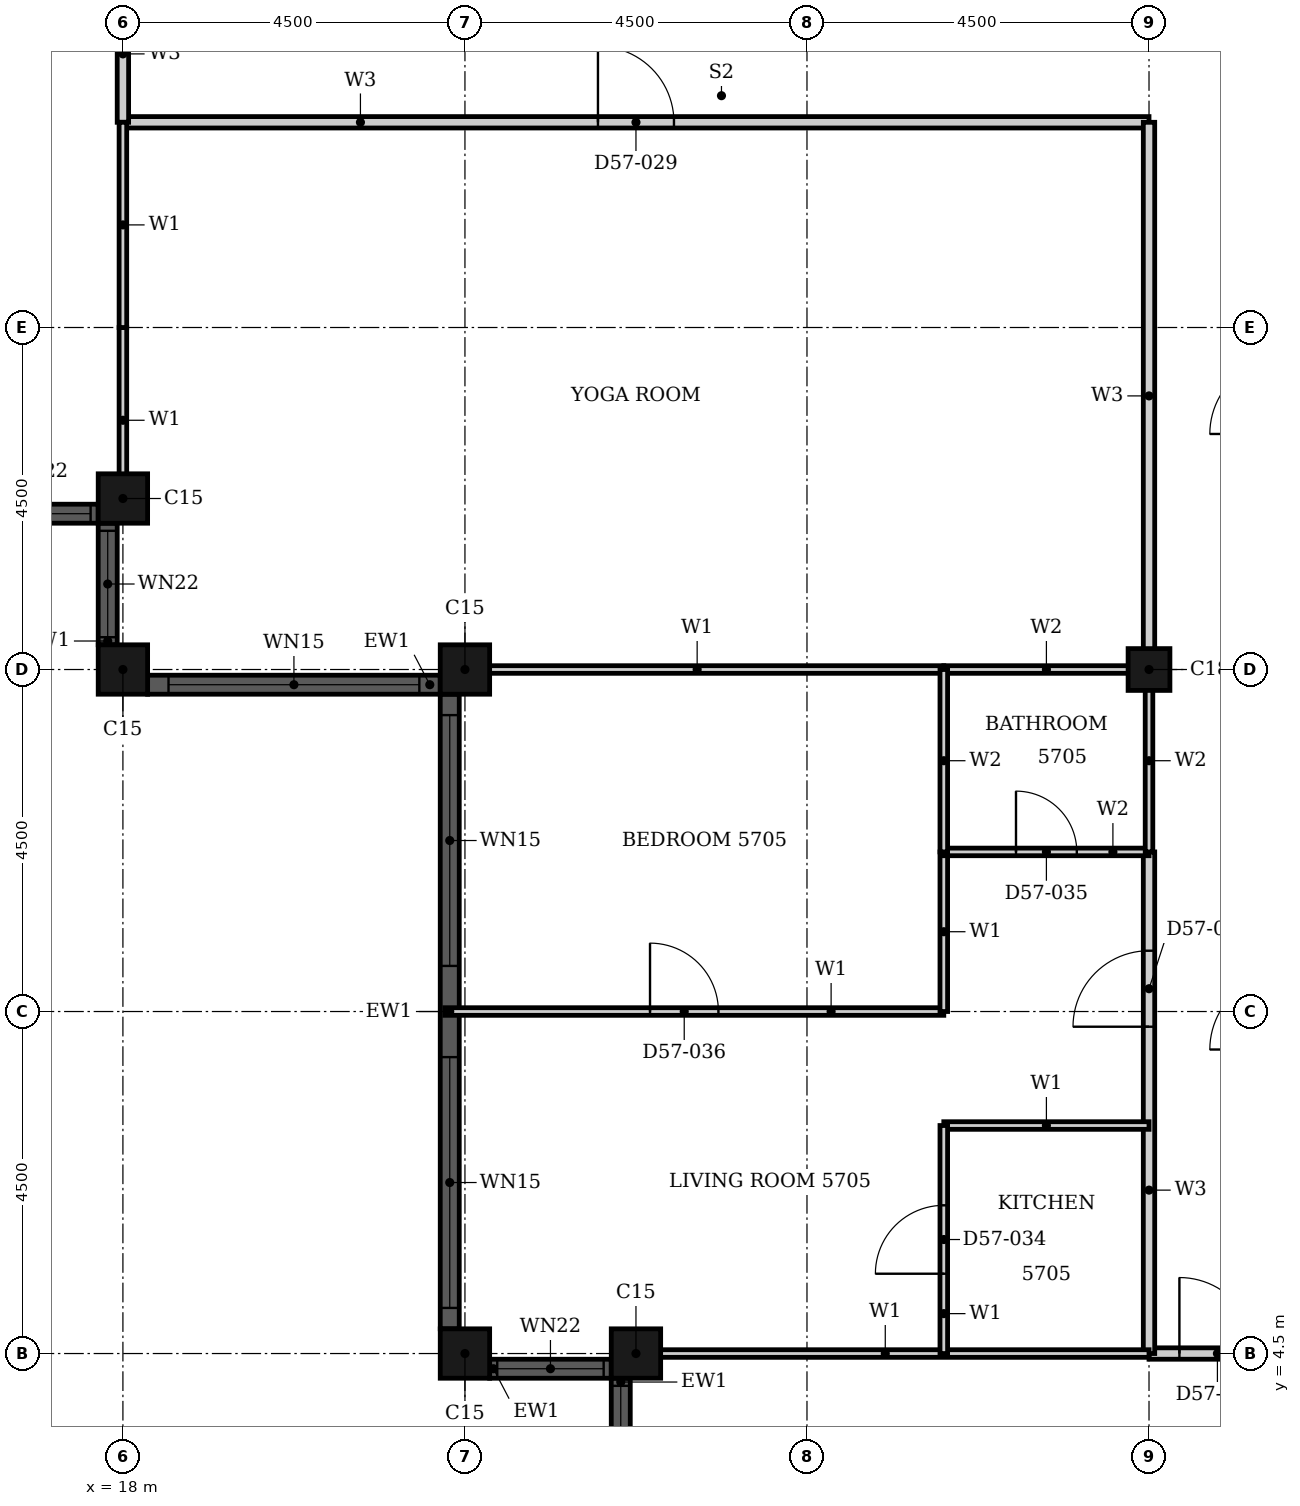
"""IFC4 building model, lengths in metres.
Left out: names, types, materials, properties, quantities, classifications, styles, units other than length and angle.
Written with IfcOpenShell. Run it as: python <this file> out.ifc"""

import sys

from ifc_helpers import new_model, si_unit, direction, frame, frame_2d, origin, origin_2d, place, context, subcontext, project, spatial, rectangle, hollow_rectangle, extrude, element, fill, save


model = new_model("IFC4")
c1 = context("Model", 3, precision=1e-05, world=origin(), true_north=direction((0.0, 1.0)))
c2 = subcontext(c1, "Body", "Model", "MODEL_VIEW")
j1 = project(units=[si_unit("LENGTHUNIT", "METRE"), si_unit("PLANEANGLEUNIT", "RADIAN")], contexts=[c1])
p1 = place(None, origin())
s1 = spatial("IfcSite", under=j1, at=p1, CompositionType="ELEMENT")
p2 = place(p1, origin())
s2 = spatial("IfcBuilding", under=s1, at=p2, CompositionType="ELEMENT")
p3 = place(p2, frame((0.0, 0.0, 225.7)))
s3 = spatial("IfcBuildingStorey", under=s2, at=p3, CompositionType="ELEMENT", Elevation=225.7)
for number, where, z_axis, x_axis in (
    (1, (18.0, 15.75, 0.0), (0.0, 0.0, 1.0), (1.0, 0.0, 0.0)),
    (2, (18.0, 13.5, 0.0), (0.0, 0.0, 1.0), (1.0, 0.0, 0.0)),
    (3, (22.5, 13.5, 0.0), (0.0, 0.0, 1.0), (1.0, 0.0, 0.0)),
    (4, (22.5, 4.5, 0.0), (0.0, 0.0, 1.0), (1.0, 0.0, 0.0)),
    (5, (24.75, 4.5, 0.0), (0.0, 0.0, 1.0), (1.0, 0.0, 0.0)),
):
    element("IfcColumn", number, at=place(p3, frame(where, z_axis=z_axis, x_axis=x_axis)), inside=s3, PredefinedType="COLUMN", context=c2, shape_type="SweptSolid", body=[
        extrude(hollow_rectangle(XDim=0.65, YDim=0.65, WallThickness=0.021, at=origin_2d()), origin(), (0.0, 0.0, 1.0), 3.7),
    ])
p4 = place(p3, frame((31.5, 13.5, 0.0), z_axis=(0.0, 0.0, 1.0), x_axis=(1.0, 0.0, 0.0)))
e6 = element("IfcColumn", 6, at=p4, inside=s3, PredefinedType="COLUMN", context=c2, shape_type="SweptSolid", body=[
    extrude(hollow_rectangle(XDim=0.55, YDim=0.55, WallThickness=0.018, at=origin_2d()), origin(), (0.0, 0.0, 1.0), 3.7),
])
p5 = place(p3, frame((16.075, 15.55, 0.0), z_axis=(0.0, 0.0, 1.0), x_axis=(1.0, 0.0, 0.0)))
e7 = element("IfcWall", 7, at=p5, inside=s3, PredefinedType="SOLIDWALL", context=c2, shape_type="SweptSolid", body=[
    extrude(rectangle(XDim=1.6, YDim=0.25, at=frame_2d((0.8, 0.0))), origin(), (0.0, 0.0, 1.0), 3.7),
])
p6 = place(p5, frame((0.1, 0.0, 0.9)))
e8 = element("IfcOpeningElement", 8, at=p6, cuts=e7, PredefinedType="OPENING", context=c2, shape_type="SweptSolid", body=[
    extrude(rectangle(XDim=1.4, YDim=1.85, at=frame_2d((0.7, 0.925))), frame((0.0, 0.135, 0.0), z_axis=(0.0, -1.0, 0.0), x_axis=(1.0, 0.0, 0.0)), (0.0, 0.0, 1.0), 0.27),
])
p7 = place(p3, frame((17.8, 15.425, 0.0), z_axis=(0.0, 0.0, 1.0), x_axis=(0.0, -1.0, 0.0)))
e9 = element("IfcWall", 9, at=p7, inside=s3, PredefinedType="SOLIDWALL", context=c2, shape_type="SweptSolid", body=[
    extrude(rectangle(XDim=1.6, YDim=0.25, at=frame_2d((0.8, 0.0))), origin(), (0.0, 0.0, 1.0), 3.7),
])
p8 = place(p7, frame((0.1, 0.0, 0.9)))
e10 = element("IfcOpeningElement", 10, at=p8, cuts=e9, PredefinedType="OPENING", context=c2, shape_type="SweptSolid", body=[
    extrude(rectangle(XDim=1.4, YDim=1.85, at=frame_2d((0.7, 0.925))), frame((0.0, 0.135, 0.0), z_axis=(0.0, -1.0, 0.0), x_axis=(1.0, 0.0, 0.0)), (0.0, 0.0, 1.0), 0.27),
])
p9 = place(p3, frame((18.325, 13.3, 0.0), z_axis=(0.0, 0.0, 1.0), x_axis=(1.0, 0.0, 0.0)))
e11 = element("IfcWall", 11, at=p9, inside=s3, PredefinedType="SOLIDWALL", context=c2, shape_type="SweptSolid", body=[
    extrude(rectangle(XDim=3.85, YDim=0.25, at=frame_2d((1.925, 0.0))), origin(), (0.0, 0.0, 1.0), 3.7),
])
p10 = place(p9, frame((0.275, 0.0, 0.45)))
e12 = element("IfcOpeningElement", 12, at=p10, cuts=e11, PredefinedType="OPENING", context=c2, shape_type="SweptSolid", body=[
    extrude(rectangle(XDim=3.3, YDim=2.3, at=frame_2d((1.65, 1.15))), frame((0.0, 0.135, 0.0), z_axis=(0.0, -1.0, 0.0), x_axis=(1.0, 0.0, 0.0)), (0.0, 0.0, 1.0), 0.27),
])
p11 = place(p3, frame((22.3, 13.175, 0.0), z_axis=(0.0, 0.0, 1.0), x_axis=(0.0, -1.0, 0.0)))
e13 = element("IfcWall", 13, at=p11, inside=s3, PredefinedType="SOLIDWALL", context=c2, shape_type="SweptSolid", body=[
    extrude(rectangle(XDim=8.35, YDim=0.25, at=frame_2d((4.175, 0.0))), origin(), (0.0, 0.0, 1.0), 3.7),
])
p12 = place(p11, frame((0.275, 0.0, 0.45)))
e14 = element("IfcOpeningElement", 14, at=p12, cuts=e13, PredefinedType="OPENING", context=c2, shape_type="SweptSolid", body=[
    extrude(rectangle(XDim=3.3, YDim=2.3, at=frame_2d((1.65, 1.15))), frame((0.0, 0.135, 0.0), z_axis=(0.0, -1.0, 0.0), x_axis=(1.0, 0.0, 0.0)), (0.0, 0.0, 1.0), 0.27),
])
p13 = place(p11, frame((4.775, 0.0, 0.45)))
e15 = element("IfcOpeningElement", 15, at=p13, cuts=e13, PredefinedType="OPENING", context=c2, shape_type="SweptSolid", body=[
    extrude(rectangle(XDim=3.3, YDim=2.3, at=frame_2d((1.65, 1.15))), frame((0.0, 0.135, 0.0), z_axis=(0.0, -1.0, 0.0), x_axis=(1.0, 0.0, 0.0)), (0.0, 0.0, 1.0), 0.27),
])
p14 = place(p3, frame((22.825, 4.3, 0.0), z_axis=(0.0, 0.0, 1.0), x_axis=(1.0, 0.0, 0.0)))
e16 = element("IfcWall", 16, at=p14, inside=s3, PredefinedType="SOLIDWALL", context=c2, shape_type="SweptSolid", body=[
    extrude(rectangle(XDim=1.6, YDim=0.25, at=frame_2d((0.8, 0.0))), origin(), (0.0, 0.0, 1.0), 3.7),
])
p15 = place(p14, frame((0.1, 0.0, 0.9)))
e17 = element("IfcOpeningElement", 17, at=p15, cuts=e16, PredefinedType="OPENING", context=c2, shape_type="SweptSolid", body=[
    extrude(rectangle(XDim=1.4, YDim=1.85, at=frame_2d((0.7, 0.925))), frame((0.0, 0.135, 0.0), z_axis=(0.0, -1.0, 0.0), x_axis=(1.0, 0.0, 0.0)), (0.0, 0.0, 1.0), 0.27),
])
p16 = place(p3, frame((24.55, 4.175, 0.0), z_axis=(0.0, 0.0, 1.0), x_axis=(0.0, -1.0, 0.0)))
e18 = element("IfcWall", 18, at=p16, inside=s3, PredefinedType="SOLIDWALL", context=c2, shape_type="SweptSolid", body=[
    extrude(rectangle(XDim=1.6, YDim=0.25, at=frame_2d((0.8, 0.0))), origin(), (0.0, 0.0, 1.0), 3.7),
])
p17 = place(p16, frame((0.1, 0.0, 0.9)))
e19 = element("IfcOpeningElement", 19, at=p17, cuts=e18, PredefinedType="OPENING", context=c2, shape_type="SweptSolid", body=[
    extrude(rectangle(XDim=1.4, YDim=1.85, at=frame_2d((0.7, 0.925))), frame((0.0, 0.135, 0.0), z_axis=(0.0, -1.0, 0.0), x_axis=(1.0, 0.0, 0.0)), (0.0, 0.0, 1.0), 0.27),
])
p18 = place(p3, frame((18.0, 20.7, 0.0), z_axis=(0.0, 0.0, 1.0), x_axis=(1.0, 0.0, 0.0)))
e20 = element("IfcWall", 20, at=p18, inside=s3, PredefinedType="PARTITIONING", context=c2, shape_type="SweptSolid", body=[
    extrude(rectangle(XDim=13.5, YDim=0.15, at=frame_2d((6.75, 0.0))), origin(), (0.0, 0.0, 1.0), 3.4),
])
p19 = place(p18, frame((6.25, 0.0, 0.0)))
e21 = element("IfcOpeningElement", 21, at=p19, cuts=e20, PredefinedType="OPENING", context=c2, shape_type="SweptSolid", body=[
    extrude(rectangle(XDim=1.0, YDim=2.1, at=frame_2d((0.5, 1.05))), frame((0.0, 0.085, 0.0), z_axis=(0.0, -1.0, 0.0), x_axis=(1.0, 0.0, 0.0)), (0.0, 0.0, 1.0), 0.17),
])
p20 = place(p3, frame((31.5, 4.5, 0.0), z_axis=(0.0, 0.0, 1.0), x_axis=(1.0, 0.0, 0.0)))
e22 = element("IfcWall", 22, at=p20, inside=s3, PredefinedType="PARTITIONING", context=c2, shape_type="SweptSolid", body=[
    extrude(rectangle(XDim=1.8, YDim=0.15, at=frame_2d((0.9, 0.0))), origin(), (0.0, 0.0, 1.0), 3.4),
])
p21 = place(p20, frame((0.4, 0.0, 0.0)))
e23 = element("IfcOpeningElement", 23, at=p21, cuts=e22, PredefinedType="OPENING", context=c2, shape_type="SweptSolid", body=[
    extrude(rectangle(XDim=1.0, YDim=2.1, at=frame_2d((0.5, 1.05))), frame((0.0, 0.085, 0.0), z_axis=(0.0, -1.0, 0.0), x_axis=(1.0, 0.0, 0.0)), (0.0, 0.0, 1.0), 0.17),
])
p22 = place(p3, frame((18.0, 20.7, 0.0), z_axis=(0.0, 0.0, 1.0), x_axis=(0.0, 1.0, 0.0)))
e24 = element("IfcWall", 24, at=p22, inside=s3, PredefinedType="PARTITIONING", context=c2, shape_type="SweptSolid", body=[
    extrude(rectangle(XDim=1.8, YDim=0.15, at=frame_2d((0.9, 0.0))), origin(), (0.0, 0.0, 1.0), 3.4),
])
p23 = place(p3, frame((31.5, 4.5, 0.0), z_axis=(0.0, 0.0, 1.0), x_axis=(0.0, 1.0, 0.0)))
e25 = element("IfcWall", 25, at=p23, inside=s3, PredefinedType="PARTITIONING", context=c2, shape_type="SweptSolid", body=[
    extrude(rectangle(XDim=6.6, YDim=0.15, at=frame_2d((3.3, 0.0))), origin(), (0.0, 0.0, 1.0), 2.68),
])
p24 = place(p23, frame((4.3, 0.0, 0.0)))
e26 = element("IfcOpeningElement", 26, at=p24, cuts=e25, PredefinedType="OPENING", context=c2, shape_type="SweptSolid", body=[
    extrude(rectangle(XDim=1.0, YDim=2.2, at=frame_2d((0.5, 1.1))), frame((0.0, 0.085, 0.0), z_axis=(0.0, -1.0, 0.0), x_axis=(1.0, 0.0, 0.0)), (0.0, 0.0, 1.0), 0.17),
])
p25 = place(p3, frame((31.5, 13.5, 0.0), z_axis=(0.0, 0.0, 1.0), x_axis=(0.0, 1.0, 0.0)))
e27 = element("IfcWall", 27, at=p25, inside=s3, PredefinedType="PARTITIONING", context=c2, shape_type="SweptSolid", body=[
    extrude(rectangle(XDim=7.2, YDim=0.15, at=frame_2d((3.6, 0.0))), origin(), (0.0, 0.0, 1.0), 3.4),
])
p26 = place(p3, frame((22.31, 13.5, 0.0), z_axis=(0.0, 0.0, 1.0), x_axis=(1.0, 0.0, 0.0)))
e28 = element("IfcWall", 28, at=p26, inside=s3, PredefinedType="PARTITIONING", context=c2, shape_type="SweptSolid", body=[
    extrude(rectangle(XDim=6.49, YDim=0.1, at=frame_2d((3.245, 0.0))), origin(), (0.0, 0.0, 1.0), 2.48),
])
p27 = place(p3, frame((24.56, 4.5, 0.0), z_axis=(0.0, 0.0, 1.0), x_axis=(1.0, 0.0, 0.0)))
e29 = element("IfcWall", 29, at=p27, inside=s3, PredefinedType="PARTITIONING", context=c2, shape_type="SweptSolid", body=[
    extrude(rectangle(XDim=6.94, YDim=0.1, at=frame_2d((3.47, 0.0))), origin(), (0.0, 0.0, 1.0), 3.4),
])
p28 = place(p3, frame((28.8, 7.5, 0.0), z_axis=(0.0, 0.0, 1.0), x_axis=(1.0, 0.0, 0.0)))
e30 = element("IfcWall", 30, at=p28, inside=s3, PredefinedType="PARTITIONING", context=c2, shape_type="SweptSolid", body=[
    extrude(rectangle(XDim=2.7, YDim=0.1, at=frame_2d((1.35, 0.0))), origin(), (0.0, 0.0, 1.0), 3.4),
])
p29 = place(p3, frame((22.235, 9.0, 0.0), z_axis=(0.0, 0.0, 1.0), x_axis=(1.0, 0.0, 0.0)))
e31 = element("IfcWall", 31, at=p29, inside=s3, PredefinedType="PARTITIONING", context=c2, shape_type="SweptSolid", body=[
    extrude(rectangle(XDim=6.565, YDim=0.1, at=frame_2d((3.282, 0.0))), origin(), (0.0, 0.0, 1.0), 3.4),
])
p30 = place(p29, frame((2.7, 0.0, 0.0)))
e32 = element("IfcOpeningElement", 32, at=p30, cuts=e31, PredefinedType="OPENING", context=c2, shape_type="SweptSolid", body=[
    extrude(rectangle(XDim=0.9, YDim=2.1, at=frame_2d((0.45, 1.05))), frame((0.0, 0.06, 0.0), z_axis=(0.0, -1.0, 0.0), x_axis=(1.0, 0.0, 0.0)), (0.0, 0.0, 1.0), 0.12),
])
p31 = place(p3, frame((18.0, 15.56, 0.0), z_axis=(0.0, 0.0, 1.0), x_axis=(0.0, 1.0, 0.0)))
e33 = element("IfcWall", 33, at=p31, inside=s3, PredefinedType="PARTITIONING", context=c2, shape_type="SweptSolid", body=[
    extrude(rectangle(XDim=2.439, YDim=0.1, at=frame_2d((1.219, 0.0))), origin(), (0.0, 0.0, 1.0), 3.4),
])
p32 = place(p3, frame((18.0, 18.0, 0.0), z_axis=(0.0, 0.0, 1.0), x_axis=(0.0, 1.0, 0.0)))
e34 = element("IfcWall", 34, at=p32, inside=s3, PredefinedType="PARTITIONING", context=c2, shape_type="SweptSolid", body=[
    extrude(rectangle(XDim=2.7, YDim=0.1, at=frame_2d((1.35, 0.0))), origin(), (0.0, 0.0, 1.0), 3.4),
])
p33 = place(p3, frame((28.8, 9.0, 0.0), z_axis=(0.0, 0.0, 1.0), x_axis=(0.0, 1.0, 0.0)))
e35 = element("IfcWall", 35, at=p33, inside=s3, PredefinedType="PARTITIONING", context=c2, shape_type="SweptSolid", body=[
    extrude(rectangle(XDim=2.1, YDim=0.1, at=frame_2d((1.05, 0.0))), origin(), (0.0, 0.0, 1.0), 3.4),
])
p34 = place(p3, frame((28.8, 4.5, 0.0), z_axis=(0.0, 0.0, 1.0), x_axis=(0.0, 1.0, 0.0)))
e36 = element("IfcWall", 36, at=p34, inside=s3, PredefinedType="PARTITIONING", context=c2, shape_type="SweptSolid", body=[
    extrude(rectangle(XDim=3.0, YDim=0.1, at=frame_2d((1.5, 0.0))), origin(), (0.0, 0.0, 1.0), 3.4),
])
p35 = place(p34, frame((1.05, 0.0, 0.0)))
e37 = element("IfcOpeningElement", 37, at=p35, cuts=e36, PredefinedType="OPENING", context=c2, shape_type="SweptSolid", body=[
    extrude(rectangle(XDim=0.9, YDim=2.1, at=frame_2d((0.45, 1.05))), frame((0.0, 0.06, 0.0), z_axis=(0.0, -1.0, 0.0), x_axis=(1.0, 0.0, 0.0)), (0.0, 0.0, 1.0), 0.12),
])
p36 = place(p3, frame((28.8, 11.1, 0.0), z_axis=(0.0, 0.0, 1.0), x_axis=(1.0, 0.0, 0.0)))
e38 = element("IfcWall", 38, at=p36, inside=s3, PredefinedType="PARTITIONING", context=c2, shape_type="SweptSolid", body=[
    extrude(rectangle(XDim=2.7, YDim=0.1, at=frame_2d((1.35, 0.0))), origin(), (0.0, 0.0, 1.0), 3.4),
])
p37 = place(p36, frame((0.95, 0.0, 0.0)))
e39 = element("IfcOpeningElement", 39, at=p37, cuts=e38, PredefinedType="OPENING", context=c2, shape_type="SweptSolid", body=[
    extrude(rectangle(XDim=0.8, YDim=2.1, at=frame_2d((0.4, 1.05))), frame((0.0, 0.06, 0.0), z_axis=(0.0, -1.0, 0.0), x_axis=(1.0, 0.0, 0.0)), (0.0, 0.0, 1.0), 0.12),
])
p38 = place(p3, frame((28.8, 13.5, 0.0), z_axis=(0.0, 0.0, 1.0), x_axis=(1.0, 0.0, 0.0)))
e40 = element("IfcWall", 40, at=p38, inside=s3, PredefinedType="PARTITIONING", context=c2, shape_type="SweptSolid", body=[
    extrude(rectangle(XDim=2.7, YDim=0.1, at=frame_2d((1.35, 0.0))), origin(), (0.0, 0.0, 1.0), 2.48),
])
p39 = place(p3, frame((28.8, 11.1, 0.0), z_axis=(0.0, 0.0, 1.0), x_axis=(0.0, 1.0, 0.0)))
e41 = element("IfcWall", 41, at=p39, inside=s3, PredefinedType="PARTITIONING", context=c2, shape_type="SweptSolid", body=[
    extrude(rectangle(XDim=2.4, YDim=0.1, at=frame_2d((1.2, 0.0))), origin(), (0.0, 0.0, 1.0), 3.4),
])
p40 = place(p3, frame((31.5, 11.1, 0.0), z_axis=(0.0, 0.0, 1.0), x_axis=(0.0, 1.0, 0.0)))
e42 = element("IfcWall", 42, at=p40, inside=s3, PredefinedType="PARTITIONING", context=c2, shape_type="SweptSolid", body=[
    extrude(rectangle(XDim=2.4, YDim=0.1, at=frame_2d((1.2, 0.0))), origin(), (0.0, 0.0, 1.0), 2.68),
])
p41 = place(p6, origin())
e43 = element("IfcWindow", 43, at=p41, inside=s3, PartitioningType="SINGLE_PANEL", PredefinedType="WINDOW", context=c2, shape_type="SweptSolid", body=[
    extrude(rectangle(XDim=1.4, YDim=1.85, at=frame_2d((0.7, 0.925))), frame((0.0, 0.03, 0.0), z_axis=(0.0, -1.0, 0.0), x_axis=(1.0, 0.0, 0.0)), (0.0, 0.0, 1.0), 0.06),
])
fill(e8, e43)
p42 = place(p8, origin())
e44 = element("IfcWindow", 44, at=p42, inside=s3, PartitioningType="SINGLE_PANEL", PredefinedType="WINDOW", context=c2, shape_type="SweptSolid", body=[
    extrude(rectangle(XDim=1.4, YDim=1.85, at=frame_2d((0.7, 0.925))), frame((0.0, 0.03, 0.0), z_axis=(0.0, -1.0, 0.0), x_axis=(1.0, 0.0, 0.0)), (0.0, 0.0, 1.0), 0.06),
])
fill(e10, e44)
p43 = place(p10, origin())
e45 = element("IfcWindow", 45, at=p43, inside=s3, PartitioningType="SINGLE_PANEL", PredefinedType="WINDOW", context=c2, shape_type="SweptSolid", body=[
    extrude(rectangle(XDim=3.3, YDim=2.3, at=frame_2d((1.65, 1.15))), frame((0.0, 0.03, 0.0), z_axis=(0.0, -1.0, 0.0), x_axis=(1.0, 0.0, 0.0)), (0.0, 0.0, 1.0), 0.06),
])
fill(e12, e45)
p44 = place(p12, origin())
e46 = element("IfcWindow", 46, at=p44, inside=s3, PartitioningType="SINGLE_PANEL", PredefinedType="WINDOW", context=c2, shape_type="SweptSolid", body=[
    extrude(rectangle(XDim=3.3, YDim=2.3, at=frame_2d((1.65, 1.15))), frame((0.0, 0.03, 0.0), z_axis=(0.0, -1.0, 0.0), x_axis=(1.0, 0.0, 0.0)), (0.0, 0.0, 1.0), 0.06),
])
fill(e14, e46)
p45 = place(p13, origin())
e47 = element("IfcWindow", 47, at=p45, inside=s3, PartitioningType="SINGLE_PANEL", PredefinedType="WINDOW", context=c2, shape_type="SweptSolid", body=[
    extrude(rectangle(XDim=3.3, YDim=2.3, at=frame_2d((1.65, 1.15))), frame((0.0, 0.03, 0.0), z_axis=(0.0, -1.0, 0.0), x_axis=(1.0, 0.0, 0.0)), (0.0, 0.0, 1.0), 0.06),
])
fill(e15, e47)
p46 = place(p15, origin())
e48 = element("IfcWindow", 48, at=p46, inside=s3, PartitioningType="SINGLE_PANEL", PredefinedType="WINDOW", context=c2, shape_type="SweptSolid", body=[
    extrude(rectangle(XDim=1.4, YDim=1.85, at=frame_2d((0.7, 0.925))), frame((0.0, 0.03, 0.0), z_axis=(0.0, -1.0, 0.0), x_axis=(1.0, 0.0, 0.0)), (0.0, 0.0, 1.0), 0.06),
])
fill(e17, e48)
p47 = place(p17, origin())
e49 = element("IfcWindow", 49, at=p47, inside=s3, PartitioningType="SINGLE_PANEL", PredefinedType="WINDOW", context=c2, shape_type="SweptSolid", body=[
    extrude(rectangle(XDim=1.4, YDim=1.85, at=frame_2d((0.7, 0.925))), frame((0.0, 0.03, 0.0), z_axis=(0.0, -1.0, 0.0), x_axis=(1.0, 0.0, 0.0)), (0.0, 0.0, 1.0), 0.06),
])
fill(e19, e49)
p48 = place(p19, origin())
e50 = element("IfcDoor", 50, at=p48, inside=s3, OperationType="SINGLE_SWING_LEFT", PredefinedType="DOOR", context=c2, shape_type="SweptSolid", body=[
    extrude(rectangle(XDim=1.0, YDim=2.1, at=frame_2d((0.5, 1.05))), frame((0.0, 0.025, 0.0), z_axis=(0.0, -1.0, 0.0), x_axis=(1.0, 0.0, 0.0)), (0.0, 0.0, 1.0), 0.05),
])
fill(e21, e50)
p49 = place(p24, origin())
e51 = element("IfcDoor", 51, at=p49, inside=s3, OperationType="SINGLE_SWING_RIGHT", PredefinedType="DOOR", context=c2, shape_type="SweptSolid", body=[
    extrude(rectangle(XDim=1.0, YDim=2.2, at=frame_2d((0.5, 1.1))), frame((0.0, 0.025, 0.0), z_axis=(0.0, -1.0, 0.0), x_axis=(1.0, 0.0, 0.0)), (0.0, 0.0, 1.0), 0.05),
])
fill(e26, e51)
p50 = place(p35, origin())
e52 = element("IfcDoor", 52, at=p50, inside=s3, OperationType="SINGLE_SWING_LEFT", PredefinedType="DOOR", context=c2, shape_type="SweptSolid", body=[
    extrude(rectangle(XDim=0.9, YDim=2.1, at=frame_2d((0.45, 1.05))), frame((0.0, 0.025, 0.0), z_axis=(0.0, -1.0, 0.0), x_axis=(1.0, 0.0, 0.0)), (0.0, 0.0, 1.0), 0.05),
])
fill(e37, e52)
p51 = place(p37, origin())
e53 = element("IfcDoor", 53, at=p51, inside=s3, OperationType="SINGLE_SWING_RIGHT", PredefinedType="DOOR", context=c2, shape_type="SweptSolid", body=[
    extrude(rectangle(XDim=0.8, YDim=2.1, at=frame_2d((0.4, 1.05))), frame((0.0, 0.025, 0.0), z_axis=(0.0, -1.0, 0.0), x_axis=(1.0, 0.0, 0.0)), (0.0, 0.0, 1.0), 0.05),
])
fill(e39, e53)
p52 = place(p30, origin())
e54 = element("IfcDoor", 54, at=p52, inside=s3, OperationType="SINGLE_SWING_LEFT", PredefinedType="DOOR", context=c2, shape_type="SweptSolid", body=[
    extrude(rectangle(XDim=0.9, YDim=2.1, at=frame_2d((0.45, 1.05))), frame((0.0, 0.025, 0.0), z_axis=(0.0, -1.0, 0.0), x_axis=(1.0, 0.0, 0.0)), (0.0, 0.0, 1.0), 0.05),
])
fill(e32, e54)
p53 = place(p21, origin())
e55 = element("IfcDoor", 55, at=p53, inside=s3, OperationType="SINGLE_SWING_LEFT", PredefinedType="DOOR", context=c2, shape_type="SweptSolid", body=[
    extrude(rectangle(XDim=1.0, YDim=2.1, at=frame_2d((0.5, 1.05))), frame((0.0, 0.025, 0.0), z_axis=(0.0, -1.0, 0.0), x_axis=(1.0, 0.0, 0.0)), (0.0, 0.0, 1.0), 0.05),
])
fill(e23, e55)
save(model, sys.argv[1])
